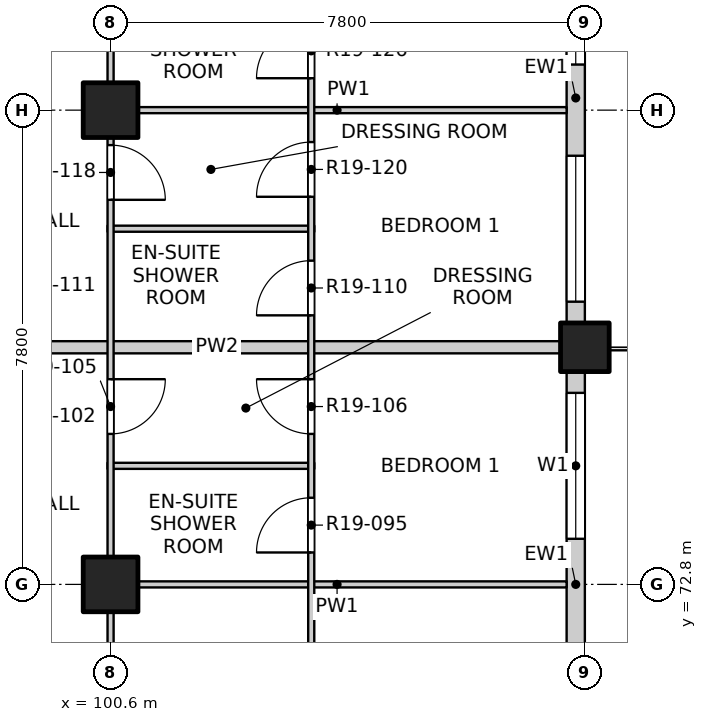
"""IFC4 building model, lengths in metres.
Left out: names, types, materials, properties, quantities, classifications, styles, units other than length and angle.
Written with IfcOpenShell. Run it as: python <this file> out.ifc"""

import sys

from ifc_helpers import new_model, si_unit, direction, frame, frame_2d, origin, origin_2d, place, context, subcontext, project, spatial, rectangle, extrude, element, fill, save


model = new_model("IFC4")
c1 = context("Model", 3, precision=1e-05, world=origin(), true_north=direction((0.0, 1.0)))
c2 = subcontext(c1, "Body", "Model", "MODEL_VIEW")
j1 = project(units=[si_unit("LENGTHUNIT", "METRE"), si_unit("PLANEANGLEUNIT", "RADIAN")], contexts=[c1])
p1 = place(None, origin())
s1 = spatial("IfcSite", under=j1, at=p1, CompositionType="ELEMENT")
p2 = place(p1, origin())
s2 = spatial("IfcBuilding", under=s1, at=p2, CompositionType="ELEMENT")
p3 = place(p2, frame((0.0, 0.0, 197.3)))
s3 = spatial("IfcBuildingStorey", under=s2, at=p3, CompositionType="ELEMENT", Elevation=197.3)
p4 = place(p3, frame((108.4, 76.7, -0.3), z_axis=(0.0, 0.0, 1.0), x_axis=(1.0, 0.0, 0.0)))
e1 = element("IfcColumn", 1, at=p4, inside=s3, PredefinedType="COLUMN", context=c2, shape_type="SweptSolid", body=[
    extrude(rectangle(XDim=0.8, YDim=0.8, at=origin_2d()), origin(), (0.0, 0.0, 1.0), 3.45),
])
for number, where, z_axis, x_axis in (
    (2, (100.6, 72.8, -0.3), (0.0, 0.0, 1.0), (1.0, 0.0, 0.0)),
    (3, (100.6, 80.6, -0.3), (0.0, 0.0, 1.0), (1.0, 0.0, 0.0)),
):
    element("IfcColumn", number, at=place(p3, frame(where, z_axis=z_axis, x_axis=x_axis)), inside=s3, PredefinedType="COLUMN", context=c2, shape_type="SweptSolid", body=[
        extrude(rectangle(XDim=0.9, YDim=0.9, at=origin_2d()), origin(), (0.0, 0.0, 1.0), 3.45),
    ])
p5 = place(p3, frame((108.25, 69.3, 0.0), z_axis=(0.0, 0.0, 1.0), x_axis=(0.0, 1.0, 0.0)))
e4 = element("IfcWall", 4, at=p5, inside=s3, PredefinedType="SOLIDWALL", context=c2, shape_type="SweptSolid", body=[
    extrude(rectangle(XDim=7.0, YDim=0.3, at=frame_2d((3.5, 0.0))), origin(), (0.0, 0.0, 1.0), 2.7),
])
p6 = place(p5, frame((0.65, 0.0, 0.0)))
e5 = element("IfcOpeningElement", 5, at=p6, cuts=e4, PredefinedType="OPENING", context=c2, shape_type="SweptSolid", body=[
    extrude(rectangle(XDim=1.8, YDim=2.4, at=frame_2d((0.9, 1.2))), frame((0.0, 0.16, 0.0), z_axis=(0.0, -1.0, 0.0), x_axis=(1.0, 0.0, 0.0)), (0.0, 0.0, 1.0), 0.32),
])
p7 = place(p5, frame((4.25, 0.0, 0.9)))
e6 = element("IfcOpeningElement", 6, at=p7, cuts=e4, PredefinedType="OPENING", context=c2, shape_type="SweptSolid", body=[
    extrude(rectangle(XDim=2.4, YDim=1.8, at=frame_2d((1.2, 0.9))), frame((0.0, 0.16, 0.0), z_axis=(0.0, -1.0, 0.0), x_axis=(1.0, 0.0, 0.0)), (0.0, 0.0, 1.0), 0.32),
])
p8 = place(p3, frame((108.25, 77.1, 0.0), z_axis=(0.0, 0.0, 1.0), x_axis=(0.0, 1.0, 0.0)))
e7 = element("IfcWall", 7, at=p8, inside=s3, PredefinedType="SOLIDWALL", context=c2, shape_type="SweptSolid", body=[
    extrude(rectangle(XDim=7.4, YDim=0.3, at=frame_2d((3.7, 0.0))), origin(), (0.0, 0.0, 1.0), 2.7),
])
p9 = place(p8, frame((0.35, 0.0, 0.9)))
e8 = element("IfcOpeningElement", 8, at=p9, cuts=e7, PredefinedType="OPENING", context=c2, shape_type="SweptSolid", body=[
    extrude(rectangle(XDim=2.4, YDim=1.8, at=frame_2d((1.2, 0.9))), frame((0.0, 0.16, 0.0), z_axis=(0.0, -1.0, 0.0), x_axis=(1.0, 0.0, 0.0)), (0.0, 0.0, 1.0), 0.32),
])
p10 = place(p8, frame((4.25, 0.0, 0.9)))
e9 = element("IfcOpeningElement", 9, at=p10, cuts=e7, PredefinedType="OPENING", context=c2, shape_type="SweptSolid", body=[
    extrude(rectangle(XDim=2.4, YDim=1.8, at=frame_2d((1.2, 0.9))), frame((0.0, 0.16, 0.0), z_axis=(0.0, -1.0, 0.0), x_axis=(1.0, 0.0, 0.0)), (0.0, 0.0, 1.0), 0.32),
])
p11 = place(p3, frame((100.55, 72.8, 0.0), z_axis=(0.0, 0.0, 1.0), x_axis=(1.0, 0.0, 0.0)))
e10 = element("IfcWall", 10, at=p11, inside=s3, PredefinedType="PARTITIONING", context=c2, shape_type="SweptSolid", body=[
    extrude(rectangle(XDim=7.55, YDim=0.1, at=frame_2d((3.775, 0.0))), origin(), (0.0, 0.0, 1.0), 3.15),
])
p12 = place(p3, frame((100.55, 74.75, 0.0), z_axis=(0.0, 0.0, 1.0), x_axis=(1.0, 0.0, 0.0)))
e11 = element("IfcWall", 11, at=p12, inside=s3, PredefinedType="PARTITIONING", context=c2, shape_type="SweptSolid", body=[
    extrude(rectangle(XDim=3.4, YDim=0.1, at=frame_2d((1.7, 0.0))), origin(), (0.0, 0.0, 1.0), 3.15),
])
p13 = place(p3, frame((96.6, 76.7, 0.0), z_axis=(0.0, 0.0, 1.0), x_axis=(1.0, 0.0, 0.0)))
e12 = element("IfcWall", 12, at=p13, inside=s3, PredefinedType="PARTITIONING", context=c2, shape_type="SweptSolid", body=[
    extrude(rectangle(XDim=11.5, YDim=0.2, at=frame_2d((5.75, 0.0))), origin(), (0.0, 0.0, 1.0), 2.55),
])
p14 = place(p3, frame((100.55, 78.65, 0.0), z_axis=(0.0, 0.0, 1.0), x_axis=(1.0, 0.0, 0.0)))
e13 = element("IfcWall", 13, at=p14, inside=s3, PredefinedType="PARTITIONING", context=c2, shape_type="SweptSolid", body=[
    extrude(rectangle(XDim=3.4, YDim=0.1, at=frame_2d((1.7, 0.0))), origin(), (0.0, 0.0, 1.0), 3.15),
])
p15 = place(p3, frame((100.55, 80.6, 0.0), z_axis=(0.0, 0.0, 1.0), x_axis=(1.0, 0.0, 0.0)))
e14 = element("IfcWall", 14, at=p15, inside=s3, PredefinedType="PARTITIONING", context=c2, shape_type="SweptSolid", body=[
    extrude(rectangle(XDim=7.55, YDim=0.1, at=frame_2d((3.775, 0.0))), origin(), (0.0, 0.0, 1.0), 3.15),
])
p16 = place(p3, frame((100.6, 41.9, 0.0), z_axis=(0.0, 0.0, 1.0), x_axis=(0.0, 1.0, 0.0)))
e15 = element("IfcWall", 15, at=p16, inside=s3, PredefinedType="PARTITIONING", context=c2, shape_type="SweptSolid", body=[
    extrude(rectangle(XDim=46.2, YDim=0.1, at=frame_2d((23.1, 0.0))), origin(), (0.0, 0.0, 1.0), 3.15),
])
p17 = place(p16, frame((1.2, 0.0, 0.0)))
e16 = element("IfcOpeningElement", 16, at=p17, cuts=e15, PredefinedType="OPENING", context=c2, shape_type="SweptSolid", body=[
    extrude(rectangle(XDim=0.9, YDim=2.1, at=frame_2d((0.45, 1.05))), frame((0.0, 0.06, 0.0), z_axis=(0.0, -1.0, 0.0), x_axis=(1.0, 0.0, 0.0)), (0.0, 0.0, 1.0), 0.12),
])
p18 = place(p16, frame((5.1, 0.0, 0.0)))
e17 = element("IfcOpeningElement", 17, at=p18, cuts=e15, PredefinedType="OPENING", context=c2, shape_type="SweptSolid", body=[
    extrude(rectangle(XDim=0.9, YDim=2.1, at=frame_2d((0.45, 1.05))), frame((0.0, 0.06, 0.0), z_axis=(0.0, -1.0, 0.0), x_axis=(1.0, 0.0, 0.0)), (0.0, 0.0, 1.0), 0.12),
])
p19 = place(p16, frame((9.975, 0.0, 0.0)))
e18 = element("IfcOpeningElement", 18, at=p19, cuts=e15, PredefinedType="OPENING", context=c2, shape_type="SweptSolid", body=[
    extrude(rectangle(XDim=0.9, YDim=2.1, at=frame_2d((0.45, 1.05))), frame((0.0, 0.06, 0.0), z_axis=(0.0, -1.0, 0.0), x_axis=(1.0, 0.0, 0.0)), (0.0, 0.0, 1.0), 0.12),
])
p20 = place(p16, frame((12.9, 0.0, 0.0)))
e19 = element("IfcOpeningElement", 19, at=p20, cuts=e15, PredefinedType="OPENING", context=c2, shape_type="SweptSolid", body=[
    extrude(rectangle(XDim=0.9, YDim=2.1, at=frame_2d((0.45, 1.05))), frame((0.0, 0.06, 0.0), z_axis=(0.0, -1.0, 0.0), x_axis=(1.0, 0.0, 0.0)), (0.0, 0.0, 1.0), 0.12),
])
p21 = place(p16, frame((17.775, 0.0, 0.0)))
e20 = element("IfcOpeningElement", 20, at=p21, cuts=e15, PredefinedType="OPENING", context=c2, shape_type="SweptSolid", body=[
    extrude(rectangle(XDim=0.9, YDim=2.1, at=frame_2d((0.45, 1.05))), frame((0.0, 0.06, 0.0), z_axis=(0.0, -1.0, 0.0), x_axis=(1.0, 0.0, 0.0)), (0.0, 0.0, 1.0), 0.12),
])
p22 = place(p16, frame((20.7, 0.0, 0.0)))
e21 = element("IfcOpeningElement", 21, at=p22, cuts=e15, PredefinedType="OPENING", context=c2, shape_type="SweptSolid", body=[
    extrude(rectangle(XDim=0.9, YDim=2.1, at=frame_2d((0.45, 1.05))), frame((0.0, 0.06, 0.0), z_axis=(0.0, -1.0, 0.0), x_axis=(1.0, 0.0, 0.0)), (0.0, 0.0, 1.0), 0.12),
])
p23 = place(p16, frame((25.575, 0.0, 0.0)))
e22 = element("IfcOpeningElement", 22, at=p23, cuts=e15, PredefinedType="OPENING", context=c2, shape_type="SweptSolid", body=[
    extrude(rectangle(XDim=0.9, YDim=2.1, at=frame_2d((0.45, 1.05))), frame((0.0, 0.06, 0.0), z_axis=(0.0, -1.0, 0.0), x_axis=(1.0, 0.0, 0.0)), (0.0, 0.0, 1.0), 0.12),
])
p24 = place(p16, frame((28.5, 0.0, 0.0)))
e23 = element("IfcOpeningElement", 23, at=p24, cuts=e15, PredefinedType="OPENING", context=c2, shape_type="SweptSolid", body=[
    extrude(rectangle(XDim=0.9, YDim=2.1, at=frame_2d((0.45, 1.05))), frame((0.0, 0.06, 0.0), z_axis=(0.0, -1.0, 0.0), x_axis=(1.0, 0.0, 0.0)), (0.0, 0.0, 1.0), 0.12),
])
p25 = place(p16, frame((33.375, 0.0, 0.0)))
e24 = element("IfcOpeningElement", 24, at=p25, cuts=e15, PredefinedType="OPENING", context=c2, shape_type="SweptSolid", body=[
    extrude(rectangle(XDim=0.9, YDim=2.1, at=frame_2d((0.45, 1.05))), frame((0.0, 0.06, 0.0), z_axis=(0.0, -1.0, 0.0), x_axis=(1.0, 0.0, 0.0)), (0.0, 0.0, 1.0), 0.12),
])
p26 = place(p16, frame((37.225, 0.0, 0.0)))
e25 = element("IfcOpeningElement", 25, at=p26, cuts=e15, PredefinedType="OPENING", context=c2, shape_type="SweptSolid", body=[
    extrude(rectangle(XDim=0.9, YDim=2.1, at=frame_2d((0.45, 1.05))), frame((0.0, 0.06, 0.0), z_axis=(0.0, -1.0, 0.0), x_axis=(1.0, 0.0, 0.0)), (0.0, 0.0, 1.0), 0.12),
])
p27 = place(p16, frame((41.175, 0.0, 0.0)))
e26 = element("IfcOpeningElement", 26, at=p27, cuts=e15, PredefinedType="OPENING", context=c2, shape_type="SweptSolid", body=[
    extrude(rectangle(XDim=0.9, YDim=2.1, at=frame_2d((0.45, 1.05))), frame((0.0, 0.06, 0.0), z_axis=(0.0, -1.0, 0.0), x_axis=(1.0, 0.0, 0.0)), (0.0, 0.0, 1.0), 0.12),
])
p28 = place(p16, frame((44.1, 0.0, 0.0)))
e27 = element("IfcOpeningElement", 27, at=p28, cuts=e15, PredefinedType="OPENING", context=c2, shape_type="SweptSolid", body=[
    extrude(rectangle(XDim=0.9, YDim=2.1, at=frame_2d((0.45, 1.05))), frame((0.0, 0.06, 0.0), z_axis=(0.0, -1.0, 0.0), x_axis=(1.0, 0.0, 0.0)), (0.0, 0.0, 1.0), 0.12),
])
p29 = place(p3, frame((103.9, 69.0, 0.0), z_axis=(0.0, 0.0, 1.0), x_axis=(0.0, 1.0, 0.0)))
e28 = element("IfcWall", 28, at=p29, inside=s3, PredefinedType="PARTITIONING", context=c2, shape_type="SweptSolid", body=[
    extrude(rectangle(XDim=19.1, YDim=0.1, at=frame_2d((9.55, 0.0))), origin(), (0.0, 0.0, 1.0), 3.15),
])
p30 = place(p29, frame((1.25, 0.0, 0.0)))
e29 = element("IfcOpeningElement", 29, at=p30, cuts=e28, PredefinedType="OPENING", context=c2, shape_type="SweptSolid", body=[
    extrude(rectangle(XDim=1.2, YDim=2.1, at=frame_2d((0.6, 1.05))), frame((0.0, 0.06, 0.0), z_axis=(0.0, -1.0, 0.0), x_axis=(1.0, 0.0, 0.0)), (0.0, 0.0, 1.0), 0.12),
])
p31 = place(p29, frame((4.325, 0.0, 0.0)))
e30 = element("IfcOpeningElement", 30, at=p31, cuts=e28, PredefinedType="OPENING", context=c2, shape_type="SweptSolid", body=[
    extrude(rectangle(XDim=0.9, YDim=2.1, at=frame_2d((0.45, 1.05))), frame((0.0, 0.06, 0.0), z_axis=(0.0, -1.0, 0.0), x_axis=(1.0, 0.0, 0.0)), (0.0, 0.0, 1.0), 0.12),
])
p32 = place(p29, frame((6.275, 0.0, 0.0)))
e31 = element("IfcOpeningElement", 31, at=p32, cuts=e28, PredefinedType="OPENING", context=c2, shape_type="SweptSolid", body=[
    extrude(rectangle(XDim=0.9, YDim=2.1, at=frame_2d((0.45, 1.05))), frame((0.0, 0.06, 0.0), z_axis=(0.0, -1.0, 0.0), x_axis=(1.0, 0.0, 0.0)), (0.0, 0.0, 1.0), 0.12),
])
p33 = place(p29, frame((8.225, 0.0, 0.0)))
e32 = element("IfcOpeningElement", 32, at=p33, cuts=e28, PredefinedType="OPENING", context=c2, shape_type="SweptSolid", body=[
    extrude(rectangle(XDim=0.9, YDim=2.1, at=frame_2d((0.45, 1.05))), frame((0.0, 0.06, 0.0), z_axis=(0.0, -1.0, 0.0), x_axis=(1.0, 0.0, 0.0)), (0.0, 0.0, 1.0), 0.12),
])
p34 = place(p29, frame((10.175, 0.0, 0.0)))
e33 = element("IfcOpeningElement", 33, at=p34, cuts=e28, PredefinedType="OPENING", context=c2, shape_type="SweptSolid", body=[
    extrude(rectangle(XDim=0.9, YDim=2.1, at=frame_2d((0.45, 1.05))), frame((0.0, 0.06, 0.0), z_axis=(0.0, -1.0, 0.0), x_axis=(1.0, 0.0, 0.0)), (0.0, 0.0, 1.0), 0.12),
])
p35 = place(p29, frame((12.125, 0.0, 0.0)))
e34 = element("IfcOpeningElement", 34, at=p35, cuts=e28, PredefinedType="OPENING", context=c2, shape_type="SweptSolid", body=[
    extrude(rectangle(XDim=0.9, YDim=2.1, at=frame_2d((0.45, 1.05))), frame((0.0, 0.06, 0.0), z_axis=(0.0, -1.0, 0.0), x_axis=(1.0, 0.0, 0.0)), (0.0, 0.0, 1.0), 0.12),
])
p36 = place(p29, frame((14.075, 0.0, 0.0)))
e35 = element("IfcOpeningElement", 35, at=p36, cuts=e28, PredefinedType="OPENING", context=c2, shape_type="SweptSolid", body=[
    extrude(rectangle(XDim=0.9, YDim=2.1, at=frame_2d((0.45, 1.05))), frame((0.0, 0.06, 0.0), z_axis=(0.0, -1.0, 0.0), x_axis=(1.0, 0.0, 0.0)), (0.0, 0.0, 1.0), 0.12),
])
p37 = place(p29, frame((16.85, 0.0, 0.0)))
e36 = element("IfcOpeningElement", 36, at=p37, cuts=e28, PredefinedType="OPENING", context=c2, shape_type="SweptSolid", body=[
    extrude(rectangle(XDim=1.2, YDim=2.1, at=frame_2d((0.6, 1.05))), frame((0.0, 0.06, 0.0), z_axis=(0.0, -1.0, 0.0), x_axis=(1.0, 0.0, 0.0)), (0.0, 0.0, 1.0), 0.12),
])
p38 = place(p7, origin())
e37 = element("IfcWindow", 37, at=p38, inside=s3, PartitioningType="DOUBLE_PANEL_VERTICAL", PredefinedType="WINDOW", context=c2, shape_type="SweptSolid", body=[
    extrude(rectangle(XDim=2.4, YDim=1.8, at=frame_2d((1.2, 0.9))), frame((0.0, 0.03, 0.0), z_axis=(0.0, -1.0, 0.0), x_axis=(1.0, 0.0, 0.0)), (0.0, 0.0, 1.0), 0.06),
])
fill(e6, e37)
p39 = place(p9, origin())
e38 = element("IfcWindow", 38, at=p39, inside=s3, PartitioningType="DOUBLE_PANEL_VERTICAL", PredefinedType="WINDOW", context=c2, shape_type="SweptSolid", body=[
    extrude(rectangle(XDim=2.4, YDim=1.8, at=frame_2d((1.2, 0.9))), frame((0.0, 0.03, 0.0), z_axis=(0.0, -1.0, 0.0), x_axis=(1.0, 0.0, 0.0)), (0.0, 0.0, 1.0), 0.06),
])
fill(e8, e38)
p40 = place(p10, origin())
e39 = element("IfcWindow", 39, at=p40, inside=s3, PartitioningType="DOUBLE_PANEL_VERTICAL", PredefinedType="WINDOW", context=c2, shape_type="SweptSolid", body=[
    extrude(rectangle(XDim=2.4, YDim=1.8, at=frame_2d((1.2, 0.9))), frame((0.0, 0.03, 0.0), z_axis=(0.0, -1.0, 0.0), x_axis=(1.0, 0.0, 0.0)), (0.0, 0.0, 1.0), 0.06),
])
fill(e9, e39)
p41 = place(p31, origin())
e40 = element("IfcDoor", 40, at=p41, inside=s3, OperationType="SINGLE_SWING_LEFT", PredefinedType="DOOR", context=c2, shape_type="SweptSolid", body=[
    extrude(rectangle(XDim=0.9, YDim=2.1, at=frame_2d((0.45, 1.05))), frame((0.0, 0.025, 0.0), z_axis=(0.0, -1.0, 0.0), x_axis=(1.0, 0.0, 0.0)), (0.0, 0.0, 1.0), 0.05),
])
fill(e30, e40)
p42 = place(p25, origin())
e41 = element("IfcDoor", 41, at=p42, inside=s3, OperationType="SINGLE_SWING_LEFT", PredefinedType="DOOR", context=c2, shape_type="SweptSolid", body=[
    extrude(rectangle(XDim=0.9, YDim=2.1, at=frame_2d((0.45, 1.05))), frame((0.0, 0.025, 0.0), z_axis=(0.0, -1.0, 0.0), x_axis=(1.0, 0.0, 0.0)), (0.0, 0.0, 1.0), 0.05),
])
fill(e24, e41)
p43 = place(p32, origin())
e42 = element("IfcDoor", 42, at=p43, inside=s3, OperationType="SINGLE_SWING_RIGHT", PredefinedType="DOOR", context=c2, shape_type="SweptSolid", body=[
    extrude(rectangle(XDim=0.9, YDim=2.1, at=frame_2d((0.45, 1.05))), frame((0.0, 0.025, 0.0), z_axis=(0.0, -1.0, 0.0), x_axis=(1.0, 0.0, 0.0)), (0.0, 0.0, 1.0), 0.05),
])
fill(e31, e42)
p44 = place(p33, origin())
e43 = element("IfcDoor", 43, at=p44, inside=s3, OperationType="SINGLE_SWING_LEFT", PredefinedType="DOOR", context=c2, shape_type="SweptSolid", body=[
    extrude(rectangle(XDim=0.9, YDim=2.1, at=frame_2d((0.45, 1.05))), frame((0.0, 0.025, 0.0), z_axis=(0.0, -1.0, 0.0), x_axis=(1.0, 0.0, 0.0)), (0.0, 0.0, 1.0), 0.05),
])
fill(e32, e43)
p45 = place(p26, origin())
e44 = element("IfcDoor", 44, at=p45, inside=s3, OperationType="SINGLE_SWING_RIGHT", PredefinedType="DOOR", context=c2, shape_type="SweptSolid", body=[
    extrude(rectangle(XDim=0.9, YDim=2.1, at=frame_2d((0.45, 1.05))), frame((0.0, 0.025, 0.0), z_axis=(0.0, -1.0, 0.0), x_axis=(1.0, 0.0, 0.0)), (0.0, 0.0, 1.0), 0.05),
])
fill(e25, e44)
p46 = place(p34, origin())
e45 = element("IfcDoor", 45, at=p46, inside=s3, OperationType="SINGLE_SWING_LEFT", PredefinedType="DOOR", context=c2, shape_type="SweptSolid", body=[
    extrude(rectangle(XDim=0.9, YDim=2.1, at=frame_2d((0.45, 1.05))), frame((0.0, 0.025, 0.0), z_axis=(0.0, -1.0, 0.0), x_axis=(1.0, 0.0, 0.0)), (0.0, 0.0, 1.0), 0.05),
])
fill(e33, e45)
p47 = place(p35, origin())
e46 = element("IfcDoor", 46, at=p47, inside=s3, OperationType="SINGLE_SWING_LEFT", PredefinedType="DOOR", context=c2, shape_type="SweptSolid", body=[
    extrude(rectangle(XDim=0.9, YDim=2.1, at=frame_2d((0.45, 1.05))), frame((0.0, 0.025, 0.0), z_axis=(0.0, -1.0, 0.0), x_axis=(1.0, 0.0, 0.0)), (0.0, 0.0, 1.0), 0.05),
])
fill(e34, e46)
save(model, sys.argv[1])
